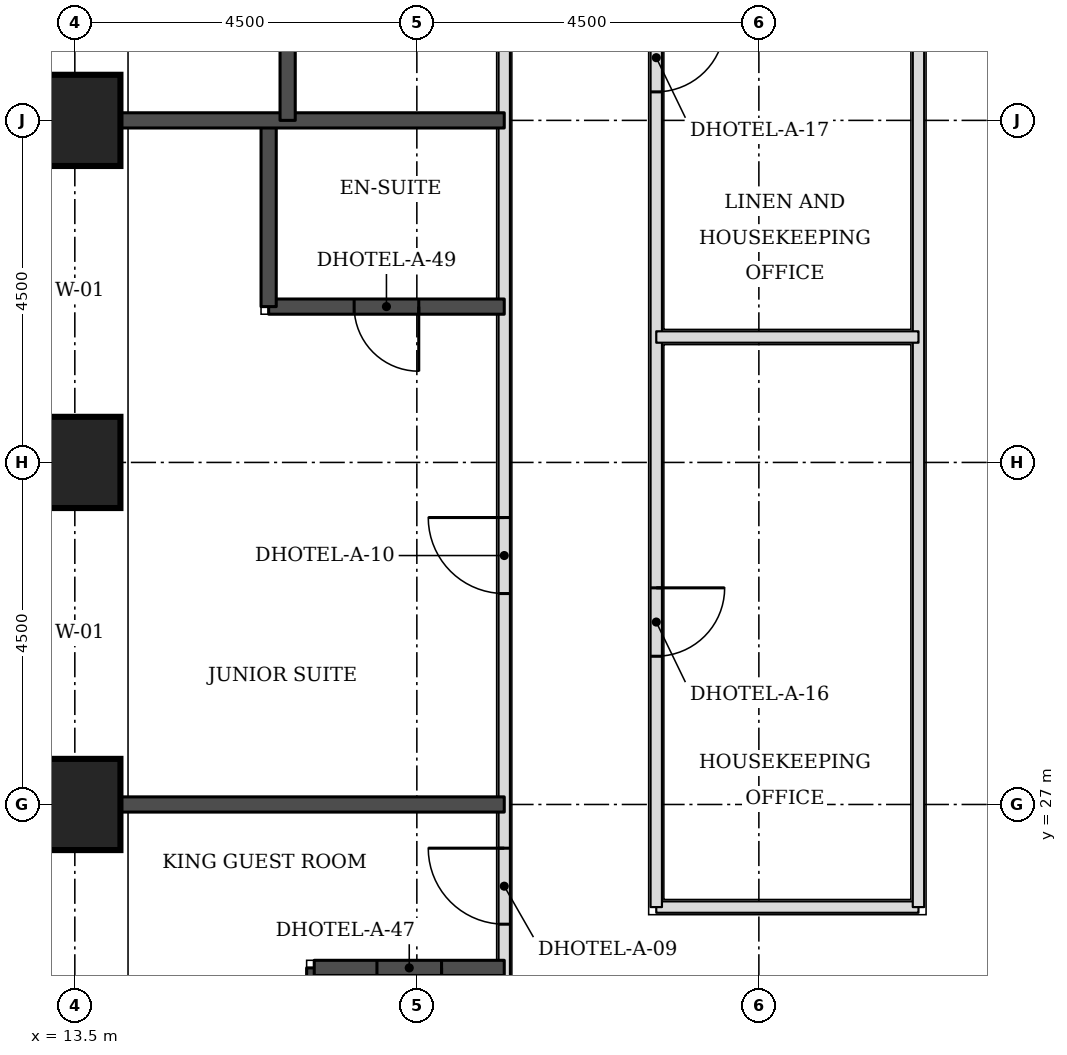
"""IFC4 building model, lengths in metres.
Left out: names, types, materials, properties, quantities, classifications, styles, units other than length and angle.
Written with IfcOpenShell. Run it as: python <this file> out.ifc"""

import sys

from ifc_helpers import new_model, si_unit, direction, frame, frame_2d, origin, origin_2d, place, context, subcontext, project, spatial, rectangle, extrude, element, fill, save


model = new_model("IFC4")
c1 = context("Model", 3, precision=1e-05, world=origin(), true_north=direction((0.0, 1.0)))
c2 = subcontext(c1, "Body", "Model", "MODEL_VIEW")
j1 = project(units=[si_unit("LENGTHUNIT", "METRE"), si_unit("PLANEANGLEUNIT", "RADIAN")], contexts=[c1])
p1 = place(None, origin())
s1 = spatial("IfcSite", under=j1, at=p1, CompositionType="ELEMENT")
p2 = place(p1, origin())
s2 = spatial("IfcBuilding", under=s1, at=p2, CompositionType="ELEMENT")
p3 = place(p2, frame((0.0, 0.0, 26.4)))
s3 = spatial("IfcBuildingStorey", under=s2, at=p3, CompositionType="ELEMENT", Elevation=26.4)
for number, where, z_axis, x_axis in (
    (1, (13.5, 27.0, 0.0), (0.0, 0.0, 1.0), (1.0, 0.0, 0.0)),
    (2, (13.5, 31.5, 0.0), (0.0, 0.0, 1.0), (1.0, 0.0, 0.0)),
    (3, (13.5, 36.0, 0.0), (0.0, 0.0, 1.0), (1.0, 0.0, 0.0)),
):
    element("IfcColumn", number, at=place(p3, frame(where, z_axis=z_axis, x_axis=x_axis)), inside=s3, PredefinedType="COLUMN", context=c2, shape_type="SweptSolid", body=[
        extrude(rectangle(XDim=1.2, YDim=1.2, at=origin_2d()), origin(), (0.0, 0.0, 1.0), 3.3),
    ])
p4 = place(p3, frame((19.15, 23.65, 0.0), z_axis=(0.0, 0.0, 1.0), x_axis=(0.0, 1.0, 0.0)))
e4 = element("IfcWall", 4, at=p4, inside=s3, PredefinedType="PARTITIONING", context=c2, shape_type="SweptSolid", body=[
    extrude(rectangle(XDim=25.85, YDim=0.15, at=frame_2d((12.925, 0.0))), origin(), (0.0, 0.0, 1.0), 3.08),
])
p5 = place(p4, frame((1.775, 0.0, 0.0)))
e5 = element("IfcOpeningElement", 5, at=p5, cuts=e4, PredefinedType="OPENING", context=c2, shape_type="SweptSolid", body=[
    extrude(rectangle(XDim=1.0, YDim=2.1, at=frame_2d((0.5, 1.05))), frame((0.0, 0.085, 0.0), z_axis=(0.0, -1.0, 0.0), x_axis=(1.0, 0.0, 0.0)), (0.0, 0.0, 1.0), 0.17),
])
p6 = place(p4, frame((6.125, 0.0, 0.0)))
e6 = element("IfcOpeningElement", 6, at=p6, cuts=e4, PredefinedType="OPENING", context=c2, shape_type="SweptSolid", body=[
    extrude(rectangle(XDim=1.0, YDim=2.1, at=frame_2d((0.5, 1.05))), frame((0.0, 0.085, 0.0), z_axis=(0.0, -1.0, 0.0), x_axis=(1.0, 0.0, 0.0)), (0.0, 0.0, 1.0), 0.17),
])
p7 = place(p4, frame((17.825, 0.0, 0.0)))
e7 = element("IfcOpeningElement", 7, at=p7, cuts=e4, PredefinedType="OPENING", context=c2, shape_type="SweptSolid", body=[
    extrude(rectangle(XDim=1.0, YDim=2.1, at=frame_2d((0.5, 1.05))), frame((0.0, 0.085, 0.0), z_axis=(0.0, -1.0, 0.0), x_axis=(1.0, 0.0, 0.0)), (0.0, 0.0, 1.0), 0.17),
])
p8 = place(p4, frame((23.04, 0.0, 0.0)))
e8 = element("IfcOpeningElement", 8, at=p8, cuts=e4, PredefinedType="OPENING", context=c2, shape_type="SweptSolid", body=[
    extrude(rectangle(XDim=0.9, YDim=2.1, at=frame_2d((0.45, 1.05))), frame((0.0, 0.085, 0.0), z_axis=(0.0, -1.0, 0.0), x_axis=(1.0, 0.0, 0.0)), (0.0, 0.0, 1.0), 0.17),
])
p9 = place(p3, frame((21.15, 25.65, 0.0), z_axis=(0.0, 0.0, 1.0), x_axis=(1.0, 0.0, 0.0)))
e9 = element("IfcWall", 9, at=p9, inside=s3, PredefinedType="PARTITIONING", context=c2, shape_type="SweptSolid", body=[
    extrude(rectangle(XDim=3.45, YDim=0.15, at=frame_2d((1.725, 0.0))), origin(), (0.0, 0.0, 1.0), 3.08),
])
p10 = place(p3, frame((21.15, 25.65, 0.0), z_axis=(0.0, 0.0, 1.0), x_axis=(0.0, 1.0, 0.0)))
e10 = element("IfcWall", 10, at=p10, inside=s3, PredefinedType="PARTITIONING", context=c2, shape_type="SweptSolid", body=[
    extrude(rectangle(XDim=17.35, YDim=0.15, at=frame_2d((8.675, 0.0))), origin(), (0.0, 0.0, 1.0), 3.08),
])
p11 = place(p10, frame((3.3, 0.0, 0.0)))
e11 = element("IfcOpeningElement", 11, at=p11, cuts=e10, PredefinedType="OPENING", context=c2, shape_type="SweptSolid", body=[
    extrude(rectangle(XDim=0.9, YDim=2.1, at=frame_2d((0.45, 1.05))), frame((0.0, 0.085, 0.0), z_axis=(0.0, -1.0, 0.0), x_axis=(1.0, 0.0, 0.0)), (0.0, 0.0, 1.0), 0.17),
])
p12 = place(p10, frame((10.725, 0.0, 0.0)))
e12 = element("IfcOpeningElement", 12, at=p12, cuts=e10, PredefinedType="OPENING", context=c2, shape_type="SweptSolid", body=[
    extrude(rectangle(XDim=0.9, YDim=2.1, at=frame_2d((0.45, 1.05))), frame((0.0, 0.085, 0.0), z_axis=(0.0, -1.0, 0.0), x_axis=(1.0, 0.0, 0.0)), (0.0, 0.0, 1.0), 0.17),
])
p13 = place(p3, frame((24.6, 25.65, 0.0), z_axis=(0.0, 0.0, 1.0), x_axis=(0.0, 1.0, 0.0)))
e13 = element("IfcWall", 13, at=p13, inside=s3, PredefinedType="PARTITIONING", context=c2, shape_type="SweptSolid", body=[
    extrude(rectangle(XDim=14.85, YDim=0.15, at=frame_2d((7.425, 0.0))), origin(), (0.0, 0.0, 1.0), 3.08),
])
p14 = place(p3, frame((16.65, 22.5, 0.0), z_axis=(0.0, 0.0, 1.0), x_axis=(0.0, 1.0, 0.0)))
e14 = element("IfcWall", 14, at=p14, inside=s3, PredefinedType="SOLIDWALL", context=c2, shape_type="SweptSolid", body=[
    extrude(rectangle(XDim=2.35, YDim=0.2, at=frame_2d((1.175, 0.0))), origin(), (0.0, 0.0, 1.0), 3.08),
])
p15 = place(p3, frame((16.65, 24.85, 0.0), z_axis=(0.0, 0.0, 1.0), x_axis=(1.0, 0.0, 0.0)))
e15 = element("IfcWall", 15, at=p15, inside=s3, PredefinedType="SOLIDWALL", context=c2, shape_type="SweptSolid", body=[
    extrude(rectangle(XDim=2.5, YDim=0.2, at=frame_2d((1.25, 0.0))), origin(), (0.0, 0.0, 1.0), 3.08),
])
p16 = place(p15, frame((0.825, 0.0, 0.0)))
e16 = element("IfcOpeningElement", 16, at=p16, cuts=e15, PredefinedType="OPENING", context=c2, shape_type="SweptSolid", body=[
    extrude(rectangle(XDim=0.85, YDim=2.1, at=frame_2d((0.425, 1.05))), frame((0.0, 0.11, 0.0), z_axis=(0.0, -1.0, 0.0), x_axis=(1.0, 0.0, 0.0)), (0.0, 0.0, 1.0), 0.22),
])
p17 = place(p3, frame((14.1, 27.0, 0.0), z_axis=(0.0, 0.0, 1.0), x_axis=(1.0, 0.0, 0.0)))
e17 = element("IfcWall", 17, at=p17, inside=s3, PredefinedType="SOLIDWALL", context=c2, shape_type="SweptSolid", body=[
    extrude(rectangle(XDim=5.05, YDim=0.2, at=frame_2d((2.525, 0.0))), origin(), (0.0, 0.0, 1.0), 3.08),
])
p18 = place(p3, frame((16.05, 33.55, 0.0), z_axis=(0.0, 0.0, 1.0), x_axis=(1.0, 0.0, 0.0)))
e18 = element("IfcWall", 18, at=p18, inside=s3, PredefinedType="SOLIDWALL", context=c2, shape_type="SweptSolid", body=[
    extrude(rectangle(XDim=3.1, YDim=0.2, at=frame_2d((1.55, 0.0))), origin(), (0.0, 0.0, 1.0), 3.08),
])
p19 = place(p18, frame((1.125, 0.0, 0.0)))
e19 = element("IfcOpeningElement", 19, at=p19, cuts=e18, PredefinedType="OPENING", context=c2, shape_type="SweptSolid", body=[
    extrude(rectangle(XDim=0.85, YDim=2.1, at=frame_2d((0.425, 1.05))), frame((0.0, 0.11, 0.0), z_axis=(0.0, -1.0, 0.0), x_axis=(1.0, 0.0, 0.0)), (0.0, 0.0, 1.0), 0.22),
])
p20 = place(p3, frame((16.05, 33.55, 0.0), z_axis=(0.0, 0.0, 1.0), x_axis=(0.0, 1.0, 0.0)))
e20 = element("IfcWall", 20, at=p20, inside=s3, PredefinedType="SOLIDWALL", context=c2, shape_type="SweptSolid", body=[
    extrude(rectangle(XDim=2.45, YDim=0.2, at=frame_2d((1.225, 0.0))), origin(), (0.0, 0.0, 1.0), 3.08),
])
p21 = place(p3, frame((14.1, 36.0, 0.0), z_axis=(0.0, 0.0, 1.0), x_axis=(1.0, 0.0, 0.0)))
e21 = element("IfcWall", 21, at=p21, inside=s3, PredefinedType="SOLIDWALL", context=c2, shape_type="SweptSolid", body=[
    extrude(rectangle(XDim=5.05, YDim=0.2, at=frame_2d((2.525, 0.0))), origin(), (0.0, 0.0, 1.0), 3.08),
])
p22 = place(p3, frame((16.3, 36.0, 0.0), z_axis=(0.0, 0.0, 1.0), x_axis=(0.0, 1.0, 0.0)))
e22 = element("IfcWall", 22, at=p22, inside=s3, PredefinedType="SOLIDWALL", context=c2, shape_type="SweptSolid", body=[
    extrude(rectangle(XDim=2.95, YDim=0.2, at=frame_2d((1.475, 0.0))), origin(), (0.0, 0.0, 1.0), 3.08),
])
p23 = place(p3, frame((21.15, 33.15, 0.0), z_axis=(0.0, 0.0, 1.0), x_axis=(1.0, 0.0, 0.0)))
e23 = element("IfcWall", 23, at=p23, inside=s3, PredefinedType="PARTITIONING", context=c2, shape_type="SweptSolid", body=[
    extrude(rectangle(XDim=3.45, YDim=0.15, at=frame_2d((1.725, 0.0))), origin(), (0.0, 0.0, 1.0), 3.08),
])
p24 = place(p5, origin())
e24 = element("IfcDoor", 24, at=p24, inside=s3, OperationType="SINGLE_SWING_RIGHT", PredefinedType="DOOR", context=c2, shape_type="SweptSolid", body=[
    extrude(rectangle(XDim=1.0, YDim=2.1, at=frame_2d((0.5, 1.05))), frame((0.0, 0.025, 0.0), z_axis=(0.0, -1.0, 0.0), x_axis=(1.0, 0.0, 0.0)), (0.0, 0.0, 1.0), 0.05),
])
fill(e5, e24)
p25 = place(p16, frame((0.85, 0.0, 0.0), z_axis=(0.0, 0.0, 1.0), x_axis=(-1.0, 0.0, 0.0)))
e25 = element("IfcDoor", 25, at=p25, inside=s3, OperationType="SINGLE_SWING_LEFT", PredefinedType="DOOR", context=c2, shape_type="SweptSolid", body=[
    extrude(rectangle(XDim=0.85, YDim=2.1, at=frame_2d((0.425, 1.05))), frame((0.0, 0.025, 0.0), z_axis=(0.0, -1.0, 0.0), x_axis=(1.0, 0.0, 0.0)), (0.0, 0.0, 1.0), 0.05),
])
fill(e16, e25)
p26 = place(p6, origin())
e26 = element("IfcDoor", 26, at=p26, inside=s3, OperationType="SINGLE_SWING_RIGHT", PredefinedType="DOOR", context=c2, shape_type="SweptSolid", body=[
    extrude(rectangle(XDim=1.0, YDim=2.1, at=frame_2d((0.5, 1.05))), frame((0.0, 0.025, 0.0), z_axis=(0.0, -1.0, 0.0), x_axis=(1.0, 0.0, 0.0)), (0.0, 0.0, 1.0), 0.05),
])
fill(e6, e26)
p27 = place(p19, frame((0.85, 0.0, 0.0), z_axis=(0.0, 0.0, 1.0), x_axis=(-1.0, 0.0, 0.0)))
e27 = element("IfcDoor", 27, at=p27, inside=s3, OperationType="SINGLE_SWING_LEFT", PredefinedType="DOOR", context=c2, shape_type="SweptSolid", body=[
    extrude(rectangle(XDim=0.85, YDim=2.1, at=frame_2d((0.425, 1.05))), frame((0.0, 0.025, 0.0), z_axis=(0.0, -1.0, 0.0), x_axis=(1.0, 0.0, 0.0)), (0.0, 0.0, 1.0), 0.05),
])
fill(e19, e27)
p28 = place(p11, frame((0.9, 0.0, 0.0), z_axis=(0.0, 0.0, 1.0), x_axis=(-1.0, 0.0, 0.0)))
e28 = element("IfcDoor", 28, at=p28, inside=s3, OperationType="SINGLE_SWING_LEFT", PredefinedType="DOOR", context=c2, shape_type="SweptSolid", body=[
    extrude(rectangle(XDim=0.9, YDim=2.1, at=frame_2d((0.45, 1.05))), frame((0.0, 0.025, 0.0), z_axis=(0.0, -1.0, 0.0), x_axis=(1.0, 0.0, 0.0)), (0.0, 0.0, 1.0), 0.05),
])
fill(e11, e28)
p29 = place(p12, frame((0.9, 0.0, 0.0), z_axis=(0.0, 0.0, 1.0), x_axis=(-1.0, 0.0, 0.0)))
e29 = element("IfcDoor", 29, at=p29, inside=s3, OperationType="SINGLE_SWING_LEFT", PredefinedType="DOOR", context=c2, shape_type="SweptSolid", body=[
    extrude(rectangle(XDim=0.9, YDim=2.1, at=frame_2d((0.45, 1.05))), frame((0.0, 0.025, 0.0), z_axis=(0.0, -1.0, 0.0), x_axis=(1.0, 0.0, 0.0)), (0.0, 0.0, 1.0), 0.05),
])
fill(e12, e29)
save(model, sys.argv[1])
